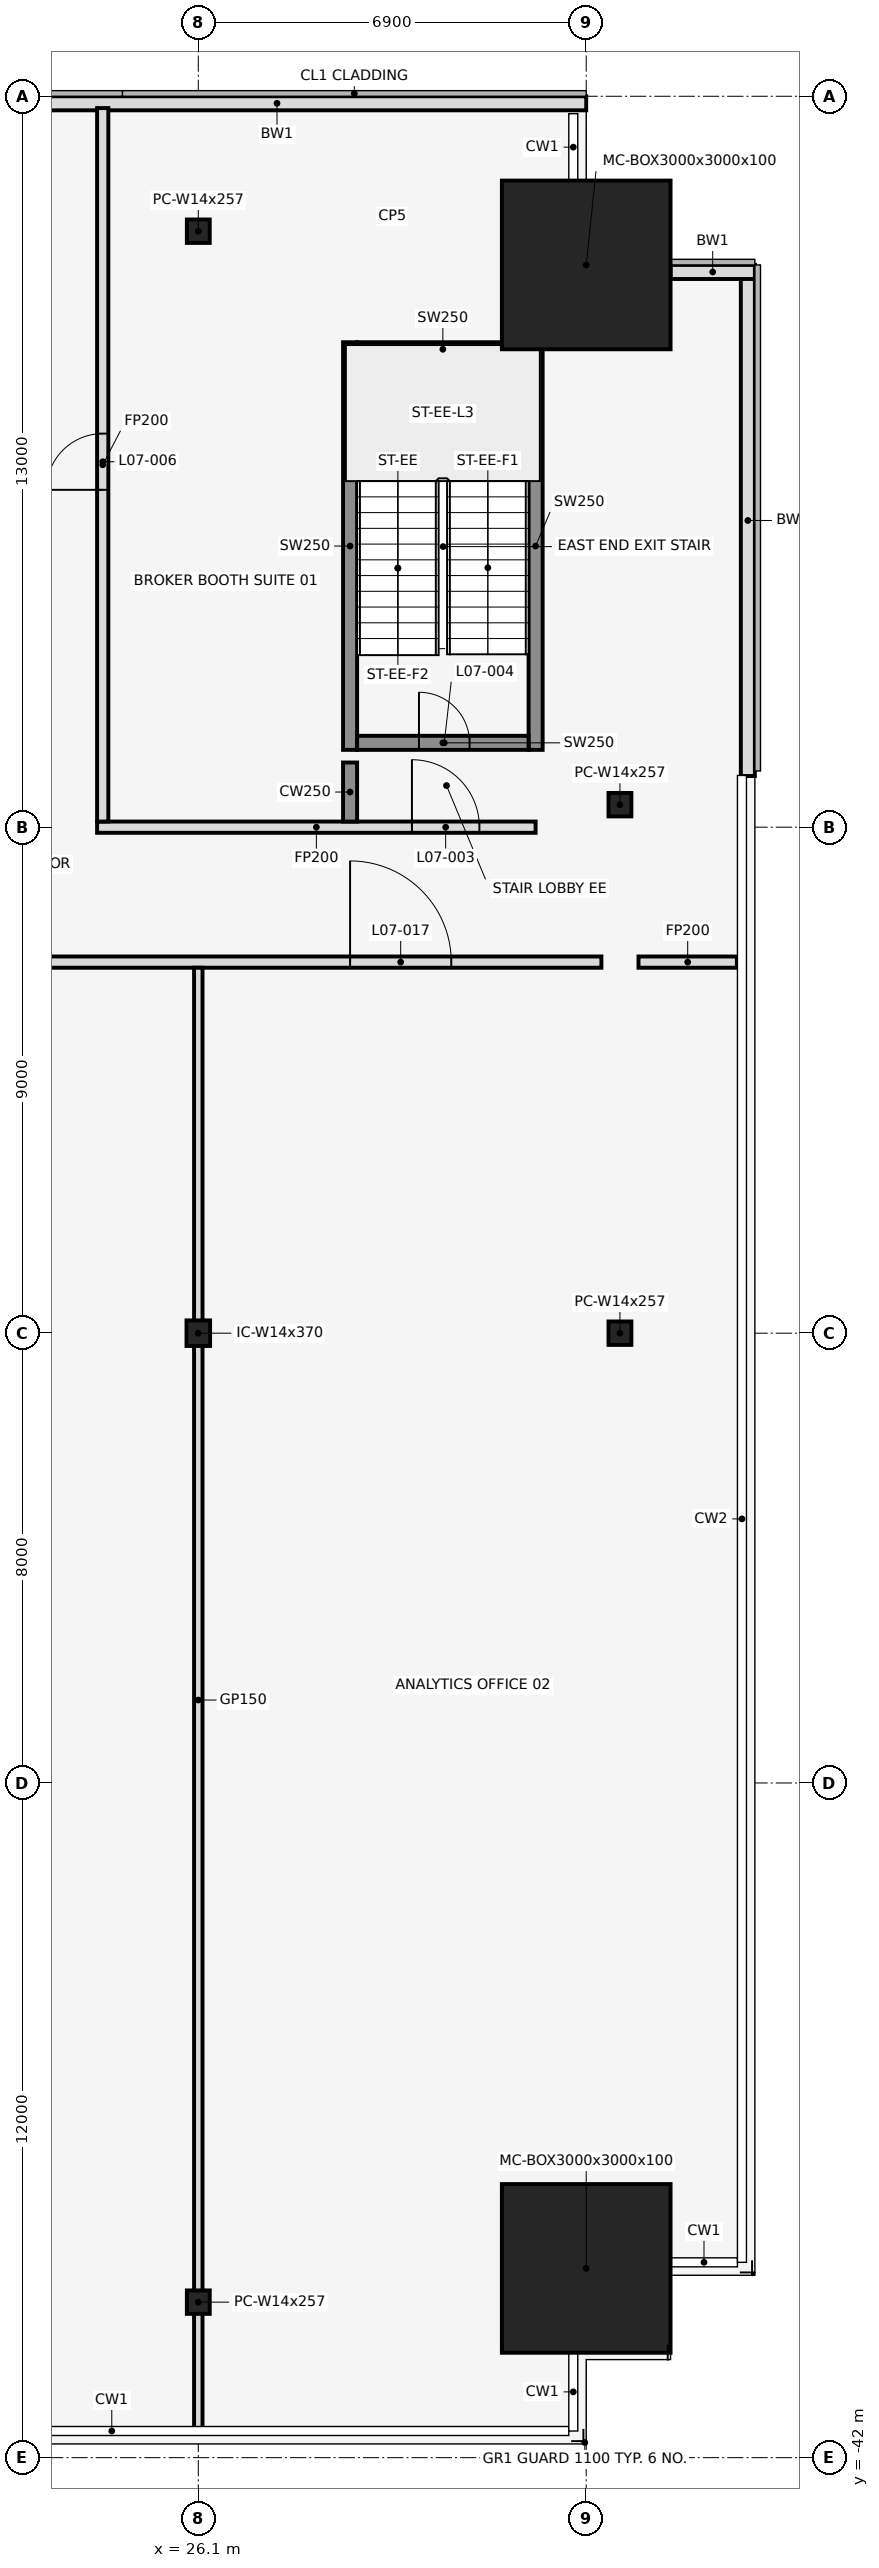
"""IFC4 building model, lengths in metres.
Left out: names, types, materials, properties, quantities, classifications, styles, units other than length and angle.
Written with IfcOpenShell. Run it as: python <this file> out.ifc"""

import sys

from ifc_helpers import new_model, si_unit, direction, frame, frame_2d, origin, origin_2d, place, context, subcontext, project, spatial, rectangle, hollow_rectangle, i_section, extrude, element, fill, save


model = new_model("IFC4")
c1 = context("Model", 3, precision=1e-05, world=origin(), true_north=direction((0.0, 1.0)))
c2 = subcontext(c1, "Body", "Model", "MODEL_VIEW")
j1 = project(units=[si_unit("LENGTHUNIT", "METRE"), si_unit("PLANEANGLEUNIT", "RADIAN")], contexts=[c1])
p1 = place(None, origin())
s1 = spatial("IfcSite", under=j1, at=p1, CompositionType="ELEMENT")
p2 = place(p1, origin())
s2 = spatial("IfcBuilding", under=s1, at=p2, CompositionType="ELEMENT")
p3 = place(p2, frame((0.0, 0.0, 39.5)))
s3 = spatial("IfcBuildingStorey", under=s2, at=p3, CompositionType="ELEMENT", Elevation=39.5)
for number, where, z_axis, x_axis in (
    (1, (26.1, -39.234, 0.0), (0.0, 0.0, 1.0), (1.0, 0.0, 0.0)),
    (2, (26.1, -2.4, 0.0), (0.0, 0.0, 1.0), (1.0, 0.0, 0.0)),
):
    element("IfcColumn", number, at=place(p3, frame(where, z_axis=z_axis, x_axis=x_axis)), inside=s3, PredefinedType="COLUMN", context=c2, shape_type="SweptSolid", body=[
        extrude(i_section(OverallWidth=0.406, OverallDepth=0.417, WebThickness=0.03, FlangeThickness=0.048, at=origin_2d()), origin(), (0.0, 0.0, 1.0), 4.5),
    ])
for number, where, z_axis, x_axis in (
    (3, (33.0, -38.634, 0.0), (0.0, 0.0, 1.0), (1.0, 0.0, 0.0)),
    (4, (33.0, -3.0, 0.0), (0.0, 0.0, 1.0), (1.0, 0.0, 0.0)),
):
    element("IfcColumn", number, at=place(p3, frame(where, z_axis=z_axis, x_axis=x_axis)), inside=s3, PredefinedType="COLUMN", context=c2, shape_type="SweptSolid", body=[
        extrude(hollow_rectangle(XDim=3.0, YDim=3.0, WallThickness=0.1, at=origin_2d()), origin(), (0.0, 0.0, 1.0), 4.5),
    ])
for number, where, z_axis, x_axis in (
    (5, (33.6, -12.6, 0.0), (0.0, 0.0, 1.0), (1.0, 0.0, 0.0)),
    (6, (33.6, -22.0, 0.0), (0.0, 0.0, 1.0), (1.0, 0.0, 0.0)),
):
    element("IfcColumn", number, at=place(p3, frame(where, z_axis=z_axis, x_axis=x_axis)), inside=s3, PredefinedType="COLUMN", context=c2, shape_type="SweptSolid", body=[
        extrude(i_section(OverallWidth=0.406, OverallDepth=0.417, WebThickness=0.03, FlangeThickness=0.048, at=origin_2d()), origin(), (0.0, 0.0, 1.0), 4.5),
    ])
p4 = place(p3, frame((26.1, -22.0, 0.0), z_axis=(0.0, 0.0, 1.0), x_axis=(1.0, 0.0, 0.0)))
e7 = element("IfcColumn", 7, at=p4, inside=s3, PredefinedType="COLUMN", context=c2, shape_type="SweptSolid", body=[
    extrude(i_section(OverallWidth=0.419, OverallDepth=0.455, WebThickness=0.042, FlangeThickness=0.068, at=origin_2d()), origin(), (0.0, 0.0, 1.0), 4.5),
])
p5 = place(p3, frame((33.0, -0.125, 0.0), z_axis=(0.0, 0.0, 1.0), x_axis=(-1.0, 0.0, 0.0)))
e8 = element("IfcWall", 8, at=p5, inside=s3, PredefinedType="STANDARD", context=c2, shape_type="SweptSolid", body=[
    extrude(rectangle(XDim=11.0, YDim=0.25, at=frame_2d((5.5, 0.0))), origin(), (0.0, 0.0, 1.0), 4.35),
])
p6 = place(p3, frame((35.875, -12.09, 0.0), z_axis=(0.0, 0.0, 1.0), x_axis=(0.0, 1.0, 0.0)))
e9 = element("IfcWall", 9, at=p6, inside=s3, PredefinedType="STANDARD", context=c2, shape_type="SweptSolid", body=[
    extrude(rectangle(XDim=9.09, YDim=0.25, at=frame_2d((4.545, 0.0))), origin(), (0.0, 0.0, 1.0), 4.35),
])
p7 = place(p3, frame((36.0, -3.125, 0.0), z_axis=(0.0, 0.0, 1.0), x_axis=(-1.0, 0.0, 0.0)))
e10 = element("IfcWall", 10, at=p7, inside=s3, PredefinedType="STANDARD", context=c2, shape_type="SweptSolid", body=[
    extrude(rectangle(XDim=1.5, YDim=0.25, at=frame_2d((0.75, 0.0))), origin(), (0.0, 0.0, 1.0), 4.35),
])
for number, where, z_axis, x_axis in (
    (11, (28.8, -11.625, 0.0), (0.0, 0.0, 1.0), (0.0, 1.0, 0.0)),
    (12, (32.1, -11.625, 0.0), (0.0, 0.0, 1.0), (0.0, 1.0, 0.0)),
):
    element("IfcWall", number, at=place(p3, frame(where, z_axis=z_axis, x_axis=x_axis)), inside=s3, PredefinedType="SHEAR", context=c2, shape_type="SweptSolid", body=[
        extrude(rectangle(XDim=7.25, YDim=0.25, at=frame_2d((3.625, 0.0))), origin(), (0.0, 0.0, 1.0), 4.5),
    ])
p8 = place(p3, frame((28.925, -11.5, 0.0), z_axis=(0.0, 0.0, 1.0), x_axis=(1.0, 0.0, 0.0)))
e13 = element("IfcWall", 13, at=p8, inside=s3, PredefinedType="SHEAR", context=c2, shape_type="SweptSolid", body=[
    extrude(rectangle(XDim=3.05, YDim=0.25, at=frame_2d((1.525, 0.0))), origin(), (0.0, 0.0, 1.0), 4.5),
])
p9 = place(p8, frame((1.1, 0.0, 0.0)))
e14 = element("IfcOpeningElement", 14, at=p9, cuts=e13, PredefinedType="OPENING", context=c2, shape_type="SweptSolid", body=[
    extrude(rectangle(XDim=0.9, YDim=2.1, at=frame_2d((0.45, 1.05))), frame((0.0, 0.137, 0.0), z_axis=(0.0, -1.0, 0.0), x_axis=(1.0, 0.0, 0.0)), (0.0, 0.0, 1.0), 0.274),
])
p10 = place(p3, frame((28.925, -4.5, 0.0), z_axis=(0.0, 0.0, 1.0), x_axis=(1.0, 0.0, 0.0)))
e15 = element("IfcWall", 15, at=p10, inside=s3, PredefinedType="SHEAR", context=c2, shape_type="SweptSolid", body=[
    extrude(rectangle(XDim=3.05, YDim=0.25, at=frame_2d((1.525, 0.0))), origin(), (0.0, 0.0, 1.0), 4.5),
])
p11 = place(p3, frame((-33.27, -15.4, 0.0), z_axis=(0.0, 0.0, 1.0), x_axis=(1.0, 0.0, 0.0)))
e16 = element("IfcWall", 16, at=p11, inside=s3, PredefinedType="PARTITIONING", context=c2, shape_type="SweptSolid", body=[
    extrude(rectangle(XDim=66.54, YDim=0.2, at=frame_2d((33.27, 0.0))), origin(), (0.0, 0.0, 1.0), 3.418),
])
p12 = place(p11, frame((1.2, 0.0, 0.0)))
e17 = element("IfcOpeningElement", 17, at=p12, cuts=e16, PredefinedType="OPENING", context=c2, shape_type="SweptSolid", body=[
    extrude(rectangle(XDim=1.8, YDim=2.1, at=frame_2d((0.9, 1.05))), frame((0.0, 0.112, 0.0), z_axis=(0.0, -1.0, 0.0), x_axis=(1.0, 0.0, 0.0)), (0.0, 0.0, 1.0), 0.224),
])
p13 = place(p11, frame((5.17, 0.0, 0.0)))
e18 = element("IfcOpeningElement", 18, at=p13, cuts=e16, PredefinedType="OPENING", context=c2, shape_type="SweptSolid", body=[
    extrude(rectangle(XDim=1.0, YDim=2.1, at=frame_2d((0.5, 1.05))), frame((0.0, 0.112, 0.0), z_axis=(0.0, -1.0, 0.0), x_axis=(1.0, 0.0, 0.0)), (0.0, 0.0, 1.0), 0.224),
])
p14 = place(p11, frame((11.07, 0.0, 0.0)))
e19 = element("IfcOpeningElement", 19, at=p14, cuts=e16, PredefinedType="OPENING", context=c2, shape_type="SweptSolid", body=[
    extrude(rectangle(XDim=0.9, YDim=2.1, at=frame_2d((0.45, 1.05))), frame((0.0, 0.112, 0.0), z_axis=(0.0, -1.0, 0.0), x_axis=(1.0, 0.0, 0.0)), (0.0, 0.0, 1.0), 0.224),
])
p15 = place(p11, frame((19.27, 0.0, 0.0)))
e20 = element("IfcOpeningElement", 20, at=p15, cuts=e16, PredefinedType="OPENING", context=c2, shape_type="SweptSolid", body=[
    extrude(rectangle(XDim=1.8, YDim=2.1, at=frame_2d((0.9, 1.05))), frame((0.0, 0.112, 0.0), z_axis=(0.0, -1.0, 0.0), x_axis=(1.0, 0.0, 0.0)), (0.0, 0.0, 1.0), 0.224),
])
p16 = place(p11, frame((27.97, 0.0, 0.0)))
e21 = element("IfcOpeningElement", 21, at=p16, cuts=e16, PredefinedType="OPENING", context=c2, shape_type="SweptSolid", body=[
    extrude(rectangle(XDim=1.8, YDim=2.1, at=frame_2d((0.9, 1.05))), frame((0.0, 0.112, 0.0), z_axis=(0.0, -1.0, 0.0), x_axis=(1.0, 0.0, 0.0)), (0.0, 0.0, 1.0), 0.224),
])
p17 = place(p11, frame((38.17, 0.0, 0.0)))
e22 = element("IfcOpeningElement", 22, at=p17, cuts=e16, PredefinedType="OPENING", context=c2, shape_type="SweptSolid", body=[
    extrude(rectangle(XDim=1.8, YDim=2.1, at=frame_2d((0.9, 1.05))), frame((0.0, 0.112, 0.0), z_axis=(0.0, -1.0, 0.0), x_axis=(1.0, 0.0, 0.0)), (0.0, 0.0, 1.0), 0.224),
])
p18 = place(p11, frame((51.27, 0.0, 0.0)))
e23 = element("IfcOpeningElement", 23, at=p18, cuts=e16, PredefinedType="OPENING", context=c2, shape_type="SweptSolid", body=[
    extrude(rectangle(XDim=1.8, YDim=2.1, at=frame_2d((0.9, 1.05))), frame((0.0, 0.112, 0.0), z_axis=(0.0, -1.0, 0.0), x_axis=(1.0, 0.0, 0.0)), (0.0, 0.0, 1.0), 0.224),
])
p19 = place(p11, frame((62.07, 0.0, 0.0)))
e24 = element("IfcOpeningElement", 24, at=p19, cuts=e16, PredefinedType="OPENING", context=c2, shape_type="SweptSolid", body=[
    extrude(rectangle(XDim=1.8, YDim=2.1, at=frame_2d((0.9, 1.05))), frame((0.0, 0.112, 0.0), z_axis=(0.0, -1.0, 0.0), x_axis=(1.0, 0.0, 0.0)), (0.0, 0.0, 1.0), 0.224),
])
p20 = place(p3, frame((33.93, -15.4, 0.0), z_axis=(0.0, 0.0, 1.0), x_axis=(1.0, 0.0, 0.0)))
e25 = element("IfcWall", 25, at=p20, inside=s3, PredefinedType="PARTITIONING", context=c2, shape_type="SweptSolid", body=[
    extrude(rectangle(XDim=1.75, YDim=0.2, at=frame_2d((0.875, 0.0))), origin(), (0.0, 0.0, 1.0), 3.418),
])
p21 = place(p3, frame((24.3, -13.0, 0.0), z_axis=(0.0, 0.0, 1.0), x_axis=(1.0, 0.0, 0.0)))
e26 = element("IfcWall", 26, at=p21, inside=s3, PredefinedType="PARTITIONING", context=c2, shape_type="SweptSolid", body=[
    extrude(rectangle(XDim=7.8, YDim=0.2, at=frame_2d((3.9, 0.0))), origin(), (0.0, 0.0, 1.0), 3.418),
])
p22 = place(p21, frame((5.6, 0.0, 0.0)))
e27 = element("IfcOpeningElement", 27, at=p22, cuts=e26, PredefinedType="OPENING", context=c2, shape_type="SweptSolid", body=[
    extrude(rectangle(XDim=1.2, YDim=2.1, at=frame_2d((0.6, 1.05))), frame((0.0, 0.112, 0.0), z_axis=(0.0, -1.0, 0.0), x_axis=(1.0, 0.0, 0.0)), (0.0, 0.0, 1.0), 0.224),
])
p23 = place(p3, frame((24.4, -12.9, 0.0), z_axis=(0.0, 0.0, 1.0), x_axis=(0.0, 1.0, 0.0)))
e28 = element("IfcWall", 28, at=p23, inside=s3, PredefinedType="PARTITIONING", context=c2, shape_type="SweptSolid", body=[
    extrude(rectangle(XDim=12.69, YDim=0.2, at=frame_2d((6.345, 0.0))), origin(), (0.0, 0.0, 1.0), 3.418),
])
p24 = place(p23, frame((5.9, 0.0, 0.0)))
e29 = element("IfcOpeningElement", 29, at=p24, cuts=e28, PredefinedType="OPENING", context=c2, shape_type="SweptSolid", body=[
    extrude(rectangle(XDim=1.0, YDim=2.1, at=frame_2d((0.5, 1.05))), frame((0.0, 0.112, 0.0), z_axis=(0.0, -1.0, 0.0), x_axis=(1.0, 0.0, 0.0)), (0.0, 0.0, 1.0), 0.224),
])
p25 = place(p3, frame((26.1, -41.55, 0.0), z_axis=(0.0, 0.0, 1.0), x_axis=(0.0, 1.0, 0.0)))
e30 = element("IfcWall", 30, at=p25, inside=s3, PredefinedType="PARTITIONING", context=c2, shape_type="SweptSolid", body=[
    extrude(rectangle(XDim=26.05, YDim=0.15, at=frame_2d((13.025, 0.0))), origin(), (0.0, 0.0, 1.0), 3.418),
])
p26 = place(p3, frame((28.8, -12.9, 0.0), z_axis=(0.0, 0.0, 1.0), x_axis=(0.0, 1.0, 0.0)))
e31 = element("IfcWall", 31, at=p26, inside=s3, PredefinedType="SHEAR", context=c2, shape_type="SweptSolid", body=[
    extrude(rectangle(XDim=1.05, YDim=0.25, at=frame_2d((0.525, 0.0))), origin(), (0.0, 0.0, 1.0), 4.5),
])
p27 = place(p22, origin())
e32 = element("IfcDoor", 32, at=p27, inside=s3, OperationType="SINGLE_SWING_RIGHT", PredefinedType="DOOR", context=c2, shape_type="SweptSolid", body=[
    extrude(rectangle(XDim=1.2, YDim=2.1, at=frame_2d((0.6, 1.05))), frame((0.0, 0.025, 0.0), z_axis=(0.0, -1.0, 0.0), x_axis=(1.0, 0.0, 0.0)), (0.0, 0.0, 1.0), 0.05),
])
fill(e27, e32)
p28 = place(p9, origin())
e33 = element("IfcDoor", 33, at=p28, inside=s3, OperationType="SINGLE_SWING_LEFT", PredefinedType="DOOR", context=c2, shape_type="SweptSolid", body=[
    extrude(rectangle(XDim=0.9, YDim=2.1, at=frame_2d((0.45, 1.05))), frame((0.0, 0.025, 0.0), z_axis=(0.0, -1.0, 0.0), x_axis=(1.0, 0.0, 0.0)), (0.0, 0.0, 1.0), 0.05),
])
fill(e14, e33)
p29 = place(p24, frame((1.0, 0.0, 0.0), z_axis=(0.0, 0.0, 1.0), x_axis=(-1.0, 0.0, 0.0)))
e34 = element("IfcDoor", 34, at=p29, inside=s3, OperationType="SINGLE_SWING_RIGHT", PredefinedType="DOOR", context=c2, shape_type="SweptSolid", body=[
    extrude(rectangle(XDim=1.0, YDim=2.1, at=frame_2d((0.5, 1.05))), frame((0.0, 0.025, 0.0), z_axis=(0.0, -1.0, 0.0), x_axis=(1.0, 0.0, 0.0)), (0.0, 0.0, 1.0), 0.05),
])
fill(e29, e34)
p30 = place(p19, origin())
e35 = element("IfcDoor", 35, at=p30, inside=s3, OperationType="SINGLE_SWING_LEFT", PredefinedType="DOOR", context=c2, shape_type="SweptSolid", body=[
    extrude(rectangle(XDim=1.8, YDim=2.1, at=frame_2d((0.9, 1.05))), frame((0.0, 0.025, 0.0), z_axis=(0.0, -1.0, 0.0), x_axis=(1.0, 0.0, 0.0)), (0.0, 0.0, 1.0), 0.05),
])
fill(e24, e35)
save(model, sys.argv[1])
